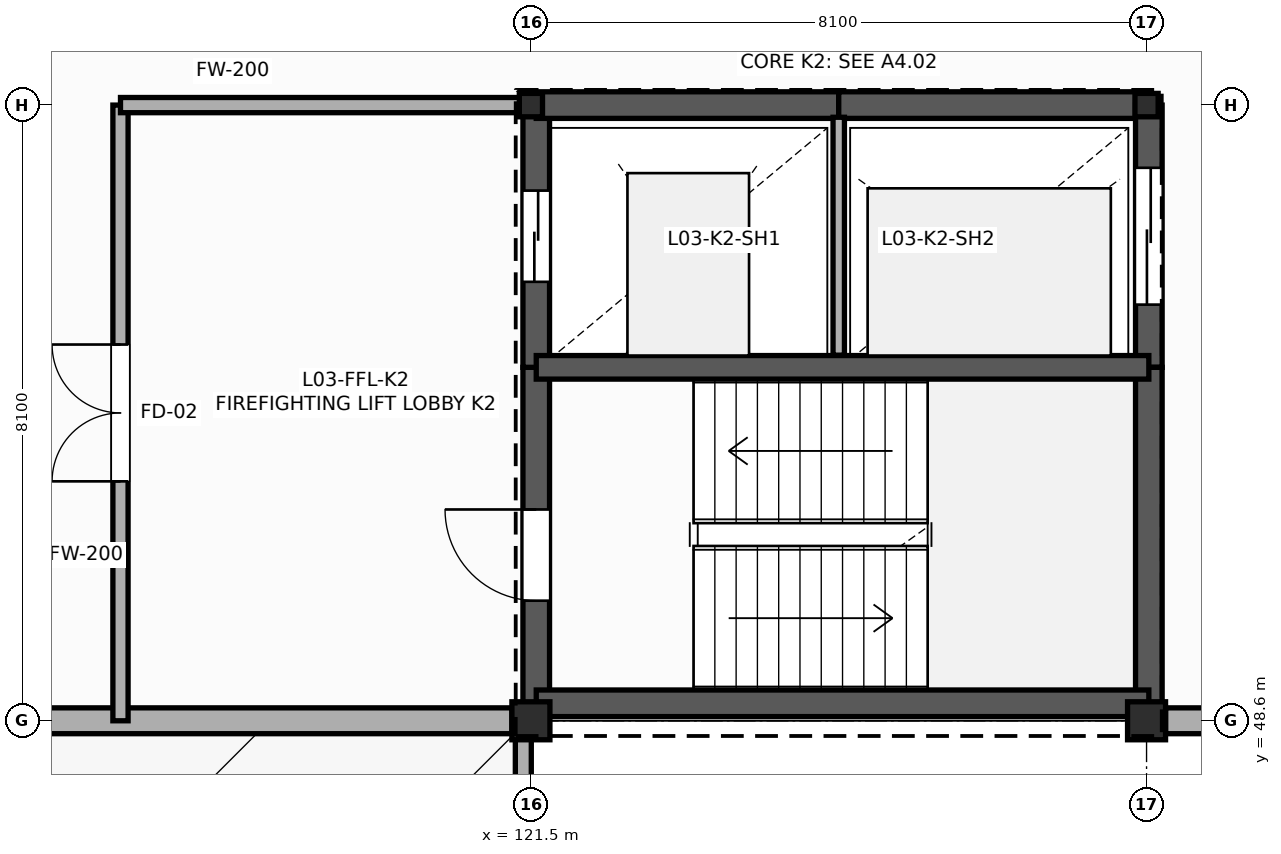
"""IFC4 building model, lengths in metres.
Left out: names, types, materials, properties, quantities, classifications, styles, units other than length and angle.
Written with IfcOpenShell. Run it as: python <this file> out.ifc"""

import sys

from ifc_helpers import new_model, si_unit, direction, frame, frame_2d, origin, origin_2d, place, context, subcontext, project, spatial, rectangle, i_section, extrude, element, fill, save


model = new_model("IFC4")
c1 = context("Model", 3, precision=1e-05, world=origin(), true_north=direction((0.0, 1.0)))
c2 = subcontext(c1, "Body", "Model", "MODEL_VIEW")
j1 = project(units=[si_unit("LENGTHUNIT", "METRE"), si_unit("PLANEANGLEUNIT", "RADIAN")], contexts=[c1])
p1 = place(None, origin())
s1 = spatial("IfcSite", under=j1, at=p1, CompositionType="ELEMENT")
p2 = place(p1, origin())
s2 = spatial("IfcBuilding", under=s1, at=p2, CompositionType="ELEMENT")
p3 = place(p2, frame((0.0, 0.0, 15.0)))
s3 = spatial("IfcBuildingStorey", under=s2, at=p3, CompositionType="ELEMENT", Elevation=15.0)
p4 = place(p3, frame((121.5, 48.6, 0.0), z_axis=(0.0, 0.0, 1.0), x_axis=(1.0, 0.0, 0.0)))
e1 = element("IfcColumn", 1, at=p4, inside=s3, PredefinedType="COLUMN", context=c2, shape_type="SweptSolid", body=[
    extrude(rectangle(XDim=0.5, YDim=0.5, at=origin_2d()), origin(), (0.0, 0.0, 1.0), 4.2),
])
p5 = place(p3, frame((121.5, 56.7, 0.0), z_axis=(0.0, 0.0, 1.0), x_axis=(1.0, 0.0, 0.0)))
e2 = element("IfcColumn", 2, at=p5, inside=s3, PredefinedType="COLUMN", context=c2, shape_type="SweptSolid", body=[
    extrude(i_section(OverallWidth=0.305, OverallDepth=0.308, WebThickness=0.01, FlangeThickness=0.015, FilletRadius=0.015, at=origin_2d()), origin(), (0.0, 0.0, 1.0), 4.2),
])
p6 = place(p3, frame((129.6, 48.6, 0.0), z_axis=(0.0, 0.0, 1.0), x_axis=(1.0, 0.0, 0.0)))
e3 = element("IfcColumn", 3, at=p6, inside=s3, PredefinedType="COLUMN", context=c2, shape_type="SweptSolid", body=[
    extrude(rectangle(XDim=0.5, YDim=0.5, at=origin_2d()), origin(), (0.0, 0.0, 1.0), 4.2),
])
p7 = place(p3, frame((129.6, 56.7, 0.0), z_axis=(0.0, 0.0, 1.0), x_axis=(1.0, 0.0, 0.0)))
e4 = element("IfcColumn", 4, at=p7, inside=s3, PredefinedType="COLUMN", context=c2, shape_type="SweptSolid", body=[
    extrude(i_section(OverallWidth=0.305, OverallDepth=0.308, WebThickness=0.01, FlangeThickness=0.015, FilletRadius=0.015, at=origin_2d()), origin(), (0.0, 0.0, 1.0), 4.2),
])
p8 = place(p3, frame((113.65, 48.6, 0.0), z_axis=(0.0, 0.0, 1.0), x_axis=(1.0, 0.0, 0.0)))
e5 = element("IfcWall", 5, at=p8, inside=s3, PredefinedType="SOLIDWALL", context=c2, shape_type="SweptSolid", body=[
    extrude(rectangle(XDim=7.6, YDim=0.34, at=frame_2d((3.8, 0.0))), origin(), (0.0, 0.0, 1.0), 3.475),
])
p9 = place(p3, frame((129.85, 48.6, 0.0), z_axis=(0.0, 0.0, 1.0), x_axis=(1.0, 0.0, 0.0)))
e6 = element("IfcWall", 6, at=p9, inside=s3, PredefinedType="SOLIDWALL", context=c2, shape_type="SweptSolid", body=[
    extrude(rectangle(XDim=7.6, YDim=0.34, at=frame_2d((3.8, 0.0))), origin(), (0.0, 0.0, 1.0), 3.475),
])
p10 = place(p3, frame((121.4, 16.3, 0.0), z_axis=(0.0, 0.0, 1.0), x_axis=(0.0, 1.0, 0.0)))
e7 = element("IfcWall", 7, at=p10, inside=s3, PredefinedType="PARAPET", context=c2, shape_type="SweptSolid", body=[
    extrude(rectangle(XDim=32.2, YDim=0.21, at=frame_2d((16.1, 0.0))), origin(), (0.0, 0.0, 1.0), 1.1),
])
p11 = place(p3, frame((121.57, 48.83, 0.0), z_axis=(0.0, 0.0, 1.0), x_axis=(0.0, 1.0, 0.0)))
e8 = element("IfcWall", 8, at=p11, inside=s3, PredefinedType="SHEAR", context=c2, shape_type="SweptSolid", body=[
    extrude(rectangle(XDim=4.42, YDim=0.35, at=frame_2d((2.21, 0.0))), origin(), (0.0, 0.0, 1.0), 4.2),
])
p12 = place(p11, frame((1.35, 0.0, 0.0)))
e9 = element("IfcOpeningElement", 9, at=p12, cuts=e8, PredefinedType="OPENING", context=c2, shape_type="SweptSolid", body=[
    extrude(rectangle(XDim=1.2, YDim=2.25, at=frame_2d((0.6, 1.125))), frame((0.0, 0.185, 0.0), z_axis=(0.0, -1.0, 0.0), x_axis=(1.0, 0.0, 0.0)), (0.0, 0.0, 1.0), 0.37),
])
p13 = place(p3, frame((121.57, 53.25, 0.0), z_axis=(0.0, 0.0, 1.0), x_axis=(0.0, 1.0, 0.0)))
e10 = element("IfcWall", 10, at=p13, inside=s3, PredefinedType="SHEAR", context=c2, shape_type="SweptSolid", body=[
    extrude(rectangle(XDim=3.45, YDim=0.35, at=frame_2d((1.725, 0.0))), origin(), (0.0, 0.0, 1.0), 4.2),
])
p14 = place(p13, frame((1.125, 0.0, 0.0)))
e11 = element("IfcOpeningElement", 11, at=p14, cuts=e10, PredefinedType="OPENING", context=c2, shape_type="SweptSolid", body=[
    extrude(rectangle(XDim=1.2, YDim=2.2, at=frame_2d((0.6, 1.1))), frame((0.0, 0.185, 0.0), z_axis=(0.0, -1.0, 0.0), x_axis=(1.0, 0.0, 0.0)), (0.0, 0.0, 1.0), 0.37),
])
p15 = place(p3, frame((121.57, 56.7, 0.0), z_axis=(0.0, 0.0, 1.0), x_axis=(1.0, 0.0, 0.0)))
e12 = element("IfcWall", 12, at=p15, inside=s3, PredefinedType="SHEAR", context=c2, shape_type="SweptSolid", body=[
    extrude(rectangle(XDim=3.98, YDim=0.35, at=frame_2d((1.99, 0.0))), origin(), (0.0, 0.0, 1.0), 4.2),
])
p16 = place(p3, frame((125.55, 56.7, 0.0), z_axis=(0.0, 0.0, 1.0), x_axis=(1.0, 0.0, 0.0)))
e13 = element("IfcWall", 13, at=p16, inside=s3, PredefinedType="SHEAR", context=c2, shape_type="SweptSolid", body=[
    extrude(rectangle(XDim=4.08, YDim=0.35, at=frame_2d((2.04, 0.0))), origin(), (0.0, 0.0, 1.0), 4.2),
])
p17 = place(p3, frame((129.63, 56.7, 0.0), z_axis=(0.0, 0.0, 1.0), x_axis=(0.0, -1.0, 0.0)))
e14 = element("IfcWall", 14, at=p17, inside=s3, PredefinedType="SHEAR", context=c2, shape_type="SweptSolid", body=[
    extrude(rectangle(XDim=3.45, YDim=0.35, at=frame_2d((1.725, 0.0))), origin(), (0.0, 0.0, 1.0), 4.2),
])
p18 = place(p17, frame((0.825, 0.0, 0.0)))
e15 = element("IfcOpeningElement", 15, at=p18, cuts=e14, PredefinedType="OPENING", context=c2, shape_type="SweptSolid", body=[
    extrude(rectangle(XDim=1.8, YDim=2.4, at=frame_2d((0.9, 1.2))), frame((0.0, 0.185, 0.0), z_axis=(0.0, -1.0, 0.0), x_axis=(1.0, 0.0, 0.0)), (0.0, 0.0, 1.0), 0.37),
])
p19 = place(p3, frame((129.63, 53.25, 0.0), z_axis=(0.0, 0.0, 1.0), x_axis=(0.0, -1.0, 0.0)))
e16 = element("IfcWall", 16, at=p19, inside=s3, PredefinedType="SHEAR", context=c2, shape_type="SweptSolid", body=[
    extrude(rectangle(XDim=4.42, YDim=0.35, at=frame_2d((2.21, 0.0))), origin(), (0.0, 0.0, 1.0), 4.2),
])
p20 = place(p3, frame((129.63, 48.83, 0.0), z_axis=(0.0, 0.0, 1.0), x_axis=(-1.0, 0.0, 0.0)))
e17 = element("IfcWall", 17, at=p20, inside=s3, PredefinedType="SHEAR", context=c2, shape_type="SweptSolid", body=[
    extrude(rectangle(XDim=8.06, YDim=0.35, at=frame_2d((4.03, 0.0))), origin(), (0.0, 0.0, 1.0), 4.2),
])
p21 = place(p3, frame((121.57, 53.25, 0.0), z_axis=(0.0, 0.0, 1.0), x_axis=(1.0, 0.0, 0.0)))
e18 = element("IfcWall", 18, at=p21, inside=s3, PredefinedType="SHEAR", context=c2, shape_type="SweptSolid", body=[
    extrude(rectangle(XDim=8.06, YDim=0.31, at=frame_2d((4.03, 0.0))), origin(), (0.0, 0.0, 1.0), 4.2),
])
p22 = place(p3, frame((125.55, 53.41, 0.0), z_axis=(0.0, 0.0, 1.0), x_axis=(0.0, 1.0, 0.0)))
e19 = element("IfcWall", 19, at=p22, inside=s3, PredefinedType="PLUMBINGWALL", context=c2, shape_type="SweptSolid", body=[
    extrude(rectangle(XDim=3.13, YDim=0.15, at=frame_2d((1.565, 0.0))), origin(), (0.0, 0.0, 1.0), 3.85),
])
p23 = place(p3, frame((116.1, 48.6, 0.0), z_axis=(0.0, 0.0, 1.0), x_axis=(0.0, 1.0, 0.0)))
e20 = element("IfcWall", 20, at=p23, inside=s3, PredefinedType="PARTITIONING", context=c2, shape_type="SweptSolid", body=[
    extrude(rectangle(XDim=8.1, YDim=0.2, at=frame_2d((4.05, 0.0))), origin(), (0.0, 0.0, 1.0), 3.9),
])
p24 = place(p23, frame((3.15, 0.0, 0.0)))
e21 = element("IfcOpeningElement", 21, at=p24, cuts=e20, PredefinedType="OPENING", context=c2, shape_type="SweptSolid", body=[
    extrude(rectangle(XDim=1.8, YDim=2.25, at=frame_2d((0.9, 1.125))), frame((0.0, 0.11, 0.0), z_axis=(0.0, -1.0, 0.0), x_axis=(1.0, 0.0, 0.0)), (0.0, 0.0, 1.0), 0.22),
])
p25 = place(p3, frame((116.1, 56.7, 0.0), z_axis=(0.0, 0.0, 1.0), x_axis=(1.0, 0.0, 0.0)))
e22 = element("IfcWall", 22, at=p25, inside=s3, PredefinedType="PARTITIONING", context=c2, shape_type="SweptSolid", body=[
    extrude(rectangle(XDim=5.47, YDim=0.2, at=frame_2d((2.735, 0.0))), origin(), (0.0, 0.0, 1.0), 3.336),
])
p26 = place(p12, origin())
e23 = element("IfcDoor", 23, at=p26, inside=s3, OperationType="SINGLE_SWING_RIGHT", PredefinedType="DOOR", context=c2, shape_type="SweptSolid", body=[
    extrude(rectangle(XDim=1.2, YDim=2.25, at=frame_2d((0.6, 1.125))), frame((0.0, 0.025, 0.0), z_axis=(0.0, -1.0, 0.0), x_axis=(1.0, 0.0, 0.0)), (0.0, 0.0, 1.0), 0.05),
])
fill(e9, e23)
p27 = place(p14, origin())
e24 = element("IfcDoor", 24, at=p27, inside=s3, OperationType="SLIDING_TO_LEFT", PredefinedType="DOOR", context=c2, shape_type="SweptSolid", body=[
    extrude(rectangle(XDim=1.2, YDim=2.2, at=frame_2d((0.6, 1.1))), frame((0.0, 0.025, 0.0), z_axis=(0.0, -1.0, 0.0), x_axis=(1.0, 0.0, 0.0)), (0.0, 0.0, 1.0), 0.05),
])
fill(e11, e24)
p28 = place(p18, origin())
e25 = element("IfcDoor", 25, at=p28, inside=s3, OperationType="SLIDING_TO_LEFT", PredefinedType="DOOR", context=c2, shape_type="SweptSolid", body=[
    extrude(rectangle(XDim=1.8, YDim=2.4, at=frame_2d((0.9, 1.2))), frame((0.0, 0.025, 0.0), z_axis=(0.0, -1.0, 0.0), x_axis=(1.0, 0.0, 0.0)), (0.0, 0.0, 1.0), 0.05),
])
fill(e15, e25)
p29 = place(p24, origin())
e26 = element("IfcDoor", 26, at=p29, inside=s3, OperationType="DOUBLE_DOOR_SINGLE_SWING", PredefinedType="DOOR", context=c2, shape_type="SweptSolid", body=[
    extrude(rectangle(XDim=1.8, YDim=2.25, at=frame_2d((0.9, 1.125))), frame((0.0, 0.025, 0.0), z_axis=(0.0, -1.0, 0.0), x_axis=(1.0, 0.0, 0.0)), (0.0, 0.0, 1.0), 0.05),
])
fill(e21, e26)
save(model, sys.argv[1])
